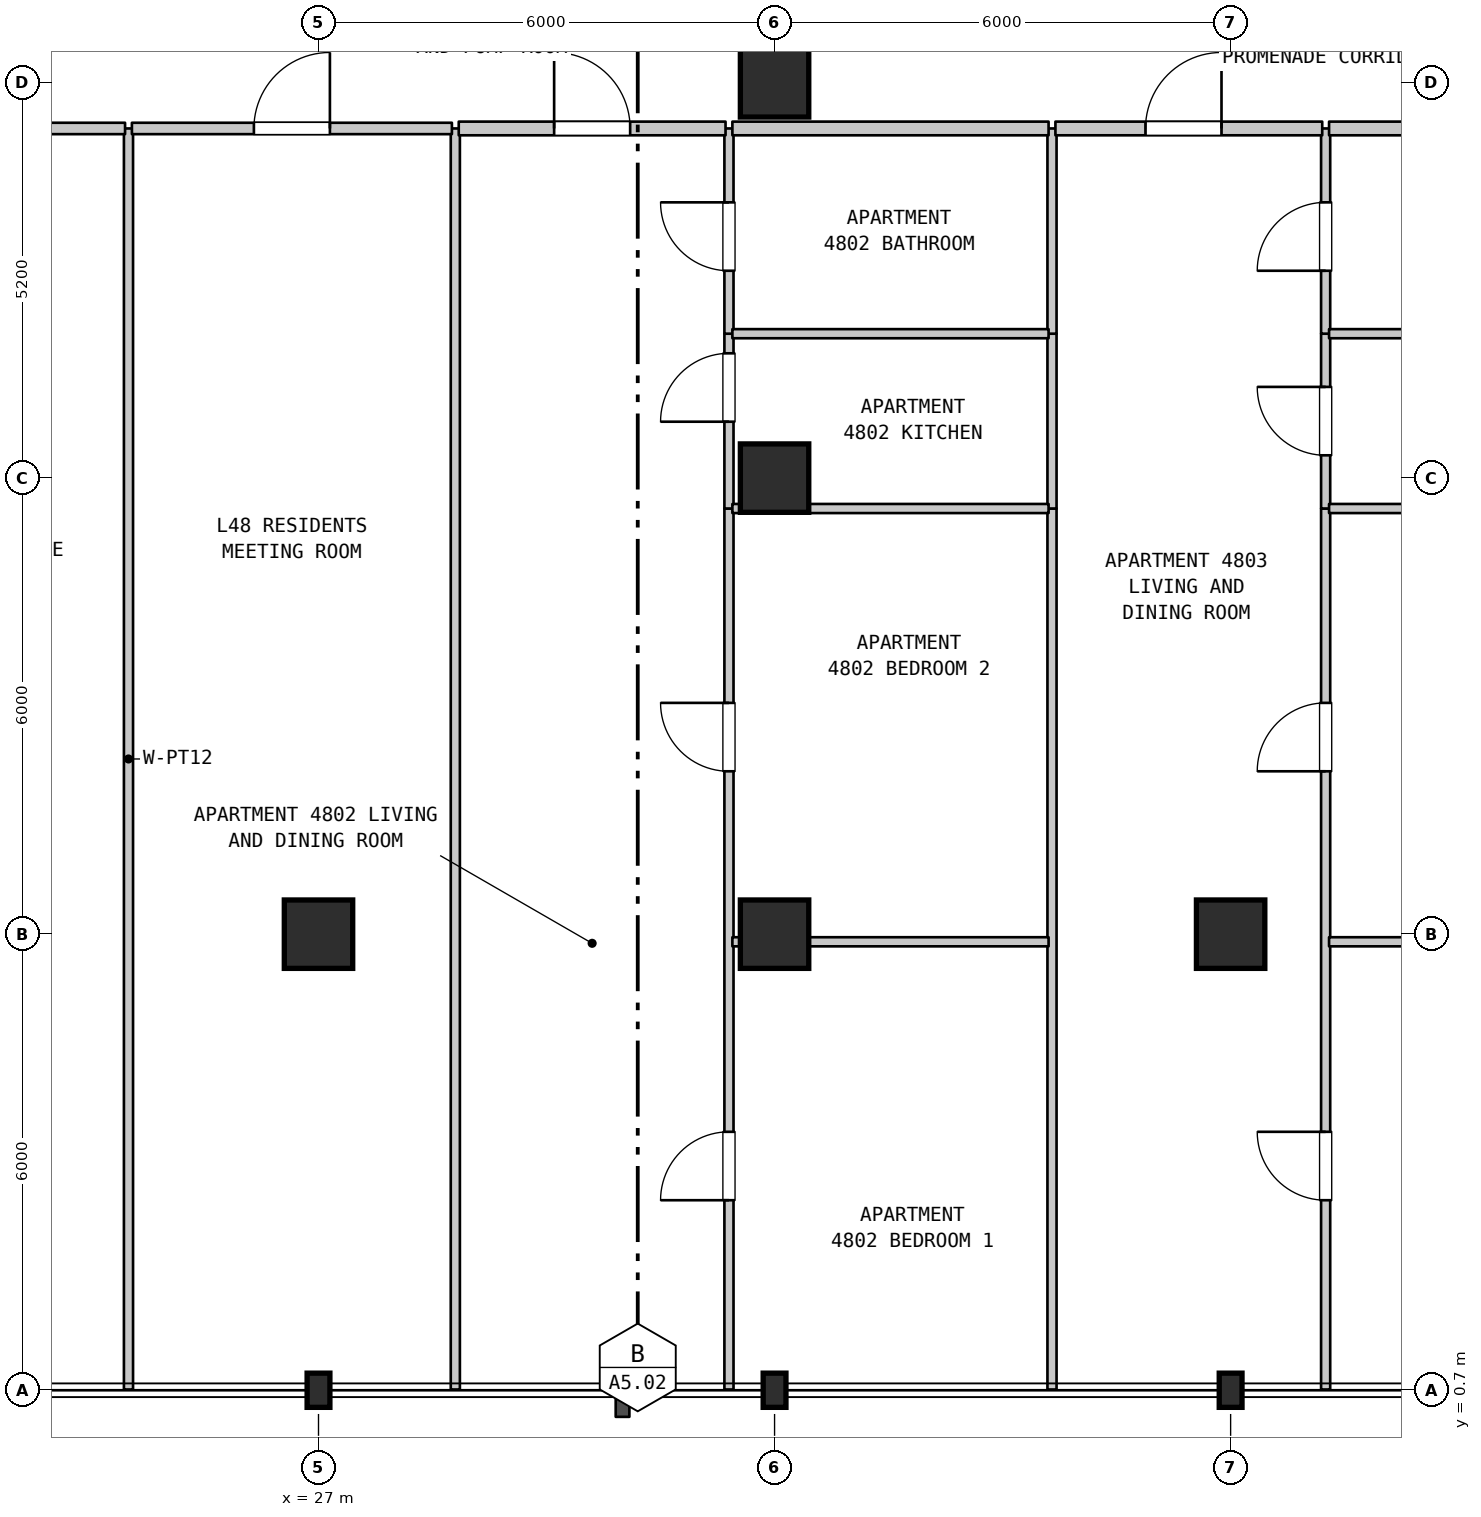
"""IFC4 building model, lengths in metres.
Left out: names, types, materials, properties, quantities, classifications, styles, units other than length and angle.
Written with IfcOpenShell. Run it as: python <this file> out.ifc"""

import sys

from ifc_helpers import new_model, si_unit, direction, frame, frame_2d, origin, origin_2d, place, context, subcontext, project, spatial, rectangle, i_section, extrude, element, fill, save


model = new_model("IFC4")
c1 = context("Model", 3, precision=1e-05, world=origin(), true_north=direction((0.0, 1.0)))
c2 = subcontext(c1, "Body", "Model", "MODEL_VIEW")
j1 = project(units=[si_unit("LENGTHUNIT", "METRE"), si_unit("PLANEANGLEUNIT", "RADIAN")], contexts=[c1])
p1 = place(None, origin())
s1 = spatial("IfcSite", under=j1, at=p1, CompositionType="ELEMENT")
p2 = place(p1, origin())
s2 = spatial("IfcBuilding", under=s1, at=p2, CompositionType="ELEMENT")
p3 = place(p2, frame((0.0, 0.0, 195.8)))
s3 = spatial("IfcBuildingStorey", under=s2, at=p3, CompositionType="ELEMENT", Elevation=195.8)
p4 = place(p3, frame((27.0, 0.7, 0.0), z_axis=(0.0, 0.0, 1.0), x_axis=(1.0, 0.0, 0.0)))
e1 = element("IfcColumn", 1, at=p4, inside=s3, PredefinedType="COLUMN", context=c2, shape_type="SweptSolid", body=[
    extrude(i_section(OverallWidth=0.3, OverallDepth=0.45, WebThickness=0.014, FlangeThickness=0.026, FilletRadius=0.027, at=origin_2d()), origin(), (0.0, 0.0, 1.0), 3.7),
])
p5 = place(p3, frame((27.0, 6.7, 0.0), z_axis=(0.0, 0.0, 1.0), x_axis=(1.0, 0.0, 0.0)))
e2 = element("IfcColumn", 2, at=p5, inside=s3, PredefinedType="COLUMN", context=c2, shape_type="SweptSolid", body=[
    extrude(rectangle(XDim=0.9, YDim=0.9, at=origin_2d()), origin(), (0.0, 0.0, 1.0), 3.7),
])
p6 = place(p3, frame((33.0, 0.7, 0.0), z_axis=(0.0, 0.0, 1.0), x_axis=(1.0, 0.0, 0.0)))
e3 = element("IfcColumn", 3, at=p6, inside=s3, PredefinedType="COLUMN", context=c2, shape_type="SweptSolid", body=[
    extrude(i_section(OverallWidth=0.3, OverallDepth=0.45, WebThickness=0.014, FlangeThickness=0.026, FilletRadius=0.027, at=origin_2d()), origin(), (0.0, 0.0, 1.0), 3.7),
])
for number, where, z_axis, x_axis in (
    (4, (33.0, 6.7, 0.0), (0.0, 0.0, 1.0), (1.0, 0.0, 0.0)),
    (5, (33.0, 12.7, 0.0), (0.0, 0.0, 1.0), (1.0, 0.0, 0.0)),
    (6, (33.0, 17.9, 0.0), (0.0, 0.0, 1.0), (1.0, 0.0, 0.0)),
):
    element("IfcColumn", number, at=place(p3, frame(where, z_axis=z_axis, x_axis=x_axis)), inside=s3, PredefinedType="COLUMN", context=c2, shape_type="SweptSolid", body=[
        extrude(rectangle(XDim=0.9, YDim=0.9, at=origin_2d()), origin(), (0.0, 0.0, 1.0), 3.7),
    ])
p7 = place(p3, frame((39.0, 0.7, 0.0), z_axis=(0.0, 0.0, 1.0), x_axis=(1.0, 0.0, 0.0)))
e7 = element("IfcColumn", 7, at=p7, inside=s3, PredefinedType="COLUMN", context=c2, shape_type="SweptSolid", body=[
    extrude(i_section(OverallWidth=0.3, OverallDepth=0.45, WebThickness=0.014, FlangeThickness=0.026, FilletRadius=0.027, at=origin_2d()), origin(), (0.0, 0.0, 1.0), 3.7),
])
p8 = place(p3, frame((39.0, 6.7, 0.0), z_axis=(0.0, 0.0, 1.0), x_axis=(1.0, 0.0, 0.0)))
e8 = element("IfcColumn", 8, at=p8, inside=s3, PredefinedType="COLUMN", context=c2, shape_type="SweptSolid", body=[
    extrude(rectangle(XDim=0.9, YDim=0.9, at=origin_2d()), origin(), (0.0, 0.0, 1.0), 3.7),
])
for number, where, z_axis, x_axis in (
    (9, (24.5, 0.71, 0.0), (0.0, 0.0, 1.0), (0.0, 1.0, 0.0)),
    (10, (28.8, 0.71, 0.0), (0.0, 0.0, 1.0), (0.0, 1.0, 0.0)),
):
    element("IfcWall", number, at=place(p3, frame(where, z_axis=z_axis, x_axis=x_axis)), inside=s3, PredefinedType="PARTITIONING", context=c2, shape_type="SweptSolid", body=[
        extrude(rectangle(XDim=16.59, YDim=0.12, at=frame_2d((8.295, 0.0))), origin(), (0.0, 0.0, 1.0), 3.39),
    ])
p9 = place(p3, frame((32.4, 0.71, 0.0), z_axis=(0.0, 0.0, 1.0), x_axis=(0.0, 1.0, 0.0)))
e11 = element("IfcWall", 11, at=p9, inside=s3, PredefinedType="PARTITIONING", context=c2, shape_type="SweptSolid", body=[
    extrude(rectangle(XDim=11.59, YDim=0.12, at=frame_2d((5.795, 0.0))), origin(), (0.0, 0.0, 1.0), 3.39),
])
p10 = place(p9, frame((2.49, 0.0, 0.0)))
e12 = element("IfcOpeningElement", 12, at=p10, cuts=e11, PredefinedType="OPENING", context=c2, shape_type="SweptSolid", body=[
    extrude(rectangle(XDim=0.9, YDim=2.15, at=frame_2d((0.45, 1.075))), frame((0.0, 0.07, 0.0), z_axis=(0.0, -1.0, 0.0), x_axis=(1.0, 0.0, 0.0)), (0.0, 0.0, 1.0), 0.14),
])
p11 = place(p9, frame((8.133, 0.0, 0.0)))
e13 = element("IfcOpeningElement", 13, at=p11, cuts=e11, PredefinedType="OPENING", context=c2, shape_type="SweptSolid", body=[
    extrude(rectangle(XDim=0.9, YDim=2.15, at=frame_2d((0.45, 1.075))), frame((0.0, 0.07, 0.0), z_axis=(0.0, -1.0, 0.0), x_axis=(1.0, 0.0, 0.0)), (0.0, 0.0, 1.0), 0.14),
])
p12 = place(p3, frame((32.4, 12.3, 0.0), z_axis=(0.0, 0.0, 1.0), x_axis=(0.0, 1.0, 0.0)))
e14 = element("IfcWall", 14, at=p12, inside=s3, PredefinedType="PARTITIONING", context=c2, shape_type="SweptSolid", body=[
    extrude(rectangle(XDim=2.3, YDim=0.12, at=frame_2d((1.15, 0.0))), origin(), (0.0, 0.0, 1.0), 3.39),
])
p13 = place(p12, frame((1.142, 0.0, 0.0)))
e15 = element("IfcOpeningElement", 15, at=p13, cuts=e14, PredefinedType="OPENING", context=c2, shape_type="SweptSolid", body=[
    extrude(rectangle(XDim=0.9, YDim=2.15, at=frame_2d((0.45, 1.075))), frame((0.0, 0.07, 0.0), z_axis=(0.0, -1.0, 0.0), x_axis=(1.0, 0.0, 0.0)), (0.0, 0.0, 1.0), 0.14),
])
p14 = place(p3, frame((32.4, 14.6, 0.0), z_axis=(0.0, 0.0, 1.0), x_axis=(0.0, 1.0, 0.0)))
e16 = element("IfcWall", 16, at=p14, inside=s3, PredefinedType="PARTITIONING", context=c2, shape_type="SweptSolid", body=[
    extrude(rectangle(XDim=2.7, YDim=0.12, at=frame_2d((1.35, 0.0))), origin(), (0.0, 0.0, 1.0), 3.39),
])
p15 = place(p14, frame((0.828, 0.0, 0.0)))
e17 = element("IfcOpeningElement", 17, at=p15, cuts=e16, PredefinedType="OPENING", context=c2, shape_type="SweptSolid", body=[
    extrude(rectangle(XDim=0.9, YDim=2.1, at=frame_2d((0.45, 1.05))), frame((0.0, 0.07, 0.0), z_axis=(0.0, -1.0, 0.0), x_axis=(1.0, 0.0, 0.0)), (0.0, 0.0, 1.0), 0.14),
])
p16 = place(p3, frame((36.65, 0.71, 0.0), z_axis=(0.0, 0.0, 1.0), x_axis=(0.0, 1.0, 0.0)))
e18 = element("IfcWall", 18, at=p16, inside=s3, PredefinedType="PARTITIONING", context=c2, shape_type="SweptSolid", body=[
    extrude(rectangle(XDim=11.59, YDim=0.12, at=frame_2d((5.795, 0.0))), origin(), (0.0, 0.0, 1.0), 3.39),
])
p17 = place(p3, frame((36.65, 12.3, 0.0), z_axis=(0.0, 0.0, 1.0), x_axis=(0.0, 1.0, 0.0)))
e19 = element("IfcWall", 19, at=p17, inside=s3, PredefinedType="PARTITIONING", context=c2, shape_type="SweptSolid", body=[
    extrude(rectangle(XDim=2.3, YDim=0.12, at=frame_2d((1.15, 0.0))), origin(), (0.0, 0.0, 1.0), 3.39),
])
p18 = place(p3, frame((36.65, 14.6, 0.0), z_axis=(0.0, 0.0, 1.0), x_axis=(0.0, 1.0, 0.0)))
e20 = element("IfcWall", 20, at=p18, inside=s3, PredefinedType="PARTITIONING", context=c2, shape_type="SweptSolid", body=[
    extrude(rectangle(XDim=2.7, YDim=0.12, at=frame_2d((1.35, 0.0))), origin(), (0.0, 0.0, 1.0), 3.39),
])
p19 = place(p3, frame((40.25, 0.71, 0.0), z_axis=(0.0, 0.0, 1.0), x_axis=(0.0, 1.0, 0.0)))
e21 = element("IfcWall", 21, at=p19, inside=s3, PredefinedType="PARTITIONING", context=c2, shape_type="SweptSolid", body=[
    extrude(rectangle(XDim=11.59, YDim=0.12, at=frame_2d((5.795, 0.0))), origin(), (0.0, 0.0, 1.0), 3.39),
])
p20 = place(p19, frame((2.49, 0.0, 0.0)))
e22 = element("IfcOpeningElement", 22, at=p20, cuts=e21, PredefinedType="OPENING", context=c2, shape_type="SweptSolid", body=[
    extrude(rectangle(XDim=0.9, YDim=2.15, at=frame_2d((0.45, 1.075))), frame((0.0, 0.07, 0.0), z_axis=(0.0, -1.0, 0.0), x_axis=(1.0, 0.0, 0.0)), (0.0, 0.0, 1.0), 0.14),
])
p21 = place(p19, frame((8.133, 0.0, 0.0)))
e23 = element("IfcOpeningElement", 23, at=p21, cuts=e21, PredefinedType="OPENING", context=c2, shape_type="SweptSolid", body=[
    extrude(rectangle(XDim=0.9, YDim=2.15, at=frame_2d((0.45, 1.075))), frame((0.0, 0.07, 0.0), z_axis=(0.0, -1.0, 0.0), x_axis=(1.0, 0.0, 0.0)), (0.0, 0.0, 1.0), 0.14),
])
p22 = place(p3, frame((40.25, 12.3, 0.0), z_axis=(0.0, 0.0, 1.0), x_axis=(0.0, 1.0, 0.0)))
e24 = element("IfcWall", 24, at=p22, inside=s3, PredefinedType="PARTITIONING", context=c2, shape_type="SweptSolid", body=[
    extrude(rectangle(XDim=2.3, YDim=0.12, at=frame_2d((1.15, 0.0))), origin(), (0.0, 0.0, 1.0), 3.39),
])
p23 = place(p22, frame((0.7, 0.0, 0.0)))
e25 = element("IfcOpeningElement", 25, at=p23, cuts=e24, PredefinedType="OPENING", context=c2, shape_type="SweptSolid", body=[
    extrude(rectangle(XDim=0.9, YDim=2.15, at=frame_2d((0.45, 1.075))), frame((0.0, 0.07, 0.0), z_axis=(0.0, -1.0, 0.0), x_axis=(1.0, 0.0, 0.0)), (0.0, 0.0, 1.0), 0.14),
])
p24 = place(p3, frame((40.25, 14.6, 0.0), z_axis=(0.0, 0.0, 1.0), x_axis=(0.0, 1.0, 0.0)))
e26 = element("IfcWall", 26, at=p24, inside=s3, PredefinedType="PARTITIONING", context=c2, shape_type="SweptSolid", body=[
    extrude(rectangle(XDim=2.7, YDim=0.12, at=frame_2d((1.35, 0.0))), origin(), (0.0, 0.0, 1.0), 3.39),
])
p25 = place(p24, frame((0.828, 0.0, 0.0)))
e27 = element("IfcOpeningElement", 27, at=p25, cuts=e26, PredefinedType="OPENING", context=c2, shape_type="SweptSolid", body=[
    extrude(rectangle(XDim=0.9, YDim=2.1, at=frame_2d((0.45, 1.05))), frame((0.0, 0.07, 0.0), z_axis=(0.0, -1.0, 0.0), x_axis=(1.0, 0.0, 0.0)), (0.0, 0.0, 1.0), 0.14),
])
p26 = place(p3, frame((32.445, 6.6, 0.0), z_axis=(0.0, 0.0, 1.0), x_axis=(1.0, 0.0, 0.0)))
e28 = element("IfcWall", 28, at=p26, inside=s3, PredefinedType="PARTITIONING", context=c2, shape_type="SweptSolid", body=[
    extrude(rectangle(XDim=4.16, YDim=0.12, at=frame_2d((2.08, 0.0))), origin(), (0.0, 0.0, 1.0), 3.09),
])
p27 = place(p3, frame((40.295, 6.6, 0.0), z_axis=(0.0, 0.0, 1.0), x_axis=(1.0, 0.0, 0.0)))
e29 = element("IfcWall", 29, at=p27, inside=s3, PredefinedType="PARTITIONING", context=c2, shape_type="SweptSolid", body=[
    extrude(rectangle(XDim=4.16, YDim=0.12, at=frame_2d((2.08, 0.0))), origin(), (0.0, 0.0, 1.0), 2.79),
])
p28 = place(p3, frame((32.445, 12.3, 0.0), z_axis=(0.0, 0.0, 1.0), x_axis=(1.0, 0.0, 0.0)))
e30 = element("IfcWall", 30, at=p28, inside=s3, PredefinedType="PARTITIONING", context=c2, shape_type="SweptSolid", body=[
    extrude(rectangle(XDim=4.16, YDim=0.12, at=frame_2d((2.08, 0.0))), origin(), (0.0, 0.0, 1.0), 3.39),
])
p29 = place(p3, frame((40.295, 12.3, 0.0), z_axis=(0.0, 0.0, 1.0), x_axis=(1.0, 0.0, 0.0)))
e31 = element("IfcWall", 31, at=p29, inside=s3, PredefinedType="PARTITIONING", context=c2, shape_type="SweptSolid", body=[
    extrude(rectangle(XDim=4.16, YDim=0.12, at=frame_2d((2.08, 0.0))), origin(), (0.0, 0.0, 1.0), 3.39),
])
p30 = place(p3, frame((32.445, 14.6, 0.0), z_axis=(0.0, 0.0, 1.0), x_axis=(1.0, 0.0, 0.0)))
e32 = element("IfcWall", 32, at=p30, inside=s3, PredefinedType="PARTITIONING", context=c2, shape_type="SweptSolid", body=[
    extrude(rectangle(XDim=4.16, YDim=0.12, at=frame_2d((2.08, 0.0))), origin(), (0.0, 0.0, 1.0), 3.39),
])
p31 = place(p3, frame((40.295, 14.6, 0.0), z_axis=(0.0, 0.0, 1.0), x_axis=(1.0, 0.0, 0.0)))
e33 = element("IfcWall", 33, at=p31, inside=s3, PredefinedType="PARTITIONING", context=c2, shape_type="SweptSolid", body=[
    extrude(rectangle(XDim=4.16, YDim=0.12, at=frame_2d((2.08, 0.0))), origin(), (0.0, 0.0, 1.0), 3.39),
])
p32 = place(p3, frame((20.545, 17.3, 0.0), z_axis=(0.0, 0.0, 1.0), x_axis=(1.0, 0.0, 0.0)))
e34 = element("IfcWall", 34, at=p32, inside=s3, PredefinedType="STANDARD", context=c2, shape_type="SweptSolid", body=[
    extrude(rectangle(XDim=3.91, YDim=0.15, at=frame_2d((1.955, 0.0))), origin(), (0.0, 0.0, 1.0), 3.39),
])
p33 = place(p32, frame((1.455, 0.0, 0.0)))
e35 = element("IfcOpeningElement", 35, at=p33, cuts=e34, PredefinedType="OPENING", context=c2, shape_type="SweptSolid", body=[
    extrude(rectangle(XDim=1.0, YDim=2.15, at=frame_2d((0.5, 1.075))), frame((0.0, 0.085, 0.0), z_axis=(0.0, -1.0, 0.0), x_axis=(1.0, 0.0, 0.0)), (0.0, 0.0, 1.0), 0.17),
])
p34 = place(p3, frame((24.545, 17.3, 0.0), z_axis=(0.0, 0.0, 1.0), x_axis=(1.0, 0.0, 0.0)))
e36 = element("IfcWall", 36, at=p34, inside=s3, PredefinedType="STANDARD", context=c2, shape_type="SweptSolid", body=[
    extrude(rectangle(XDim=4.21, YDim=0.15, at=frame_2d((2.105, 0.0))), origin(), (0.0, 0.0, 1.0), 3.39),
])
p35 = place(p34, frame((1.605, 0.0, 0.0)))
e37 = element("IfcOpeningElement", 37, at=p35, cuts=e36, PredefinedType="OPENING", context=c2, shape_type="SweptSolid", body=[
    extrude(rectangle(XDim=1.0, YDim=2.15, at=frame_2d((0.5, 1.075))), frame((0.0, 0.085, 0.0), z_axis=(0.0, -1.0, 0.0), x_axis=(1.0, 0.0, 0.0)), (0.0, 0.0, 1.0), 0.17),
])
p36 = place(p3, frame((28.845, 17.3, 0.0), z_axis=(0.0, 0.0, 1.0), x_axis=(1.0, 0.0, 0.0)))
e38 = element("IfcWall", 38, at=p36, inside=s3, PredefinedType="STANDARD", context=c2, shape_type="SweptSolid", body=[
    extrude(rectangle(XDim=3.51, YDim=0.18, at=frame_2d((1.755, 0.0))), origin(), (0.0, 0.0, 1.0), 3.39),
])
p37 = place(p36, frame((1.255, 0.0, 0.0)))
e39 = element("IfcOpeningElement", 39, at=p37, cuts=e38, PredefinedType="OPENING", context=c2, shape_type="SweptSolid", body=[
    extrude(rectangle(XDim=1.0, YDim=2.15, at=frame_2d((0.5, 1.075))), frame((0.0, 0.1, 0.0), z_axis=(0.0, -1.0, 0.0), x_axis=(1.0, 0.0, 0.0)), (0.0, 0.0, 1.0), 0.2),
])
p38 = place(p3, frame((32.445, 17.3, 0.0), z_axis=(0.0, 0.0, 1.0), x_axis=(1.0, 0.0, 0.0)))
e40 = element("IfcWall", 40, at=p38, inside=s3, PredefinedType="STANDARD", context=c2, shape_type="SweptSolid", body=[
    extrude(rectangle(XDim=4.16, YDim=0.18, at=frame_2d((2.08, 0.0))), origin(), (0.0, 0.0, 1.0), 3.39),
])
p39 = place(p3, frame((36.695, 17.3, 0.0), z_axis=(0.0, 0.0, 1.0), x_axis=(1.0, 0.0, 0.0)))
e41 = element("IfcWall", 41, at=p39, inside=s3, PredefinedType="STANDARD", context=c2, shape_type="SweptSolid", body=[
    extrude(rectangle(XDim=3.51, YDim=0.18, at=frame_2d((1.755, 0.0))), origin(), (0.0, 0.0, 1.0), 3.39),
])
p40 = place(p39, frame((1.185, 0.0, 0.0)))
e42 = element("IfcOpeningElement", 42, at=p40, cuts=e41, PredefinedType="OPENING", context=c2, shape_type="SweptSolid", body=[
    extrude(rectangle(XDim=1.0, YDim=2.15, at=frame_2d((0.5, 1.075))), frame((0.0, 0.1, 0.0), z_axis=(0.0, -1.0, 0.0), x_axis=(1.0, 0.0, 0.0)), (0.0, 0.0, 1.0), 0.2),
])
p41 = place(p3, frame((40.295, 17.3, 0.0), z_axis=(0.0, 0.0, 1.0), x_axis=(1.0, 0.0, 0.0)))
e43 = element("IfcWall", 43, at=p41, inside=s3, PredefinedType="STANDARD", context=c2, shape_type="SweptSolid", body=[
    extrude(rectangle(XDim=4.16, YDim=0.18, at=frame_2d((2.08, 0.0))), origin(), (0.0, 0.0, 1.0), 3.39),
])
p42 = place(p10, origin())
e44 = element("IfcDoor", 44, at=p42, inside=s3, OperationType="SINGLE_SWING_LEFT", PredefinedType="DOOR", context=c2, shape_type="SweptSolid", body=[
    extrude(rectangle(XDim=0.9, YDim=2.15, at=frame_2d((0.45, 1.075))), frame((0.0, 0.025, 0.0), z_axis=(0.0, -1.0, 0.0), x_axis=(1.0, 0.0, 0.0)), (0.0, 0.0, 1.0), 0.05),
])
fill(e12, e44)
p43 = place(p11, origin())
e45 = element("IfcDoor", 45, at=p43, inside=s3, OperationType="SINGLE_SWING_RIGHT", PredefinedType="DOOR", context=c2, shape_type="SweptSolid", body=[
    extrude(rectangle(XDim=0.9, YDim=2.15, at=frame_2d((0.45, 1.075))), frame((0.0, 0.025, 0.0), z_axis=(0.0, -1.0, 0.0), x_axis=(1.0, 0.0, 0.0)), (0.0, 0.0, 1.0), 0.05),
])
fill(e13, e45)
p44 = place(p13, origin())
e46 = element("IfcDoor", 46, at=p44, inside=s3, OperationType="SINGLE_SWING_LEFT", PredefinedType="DOOR", context=c2, shape_type="SweptSolid", body=[
    extrude(rectangle(XDim=0.9, YDim=2.15, at=frame_2d((0.45, 1.075))), frame((0.0, 0.025, 0.0), z_axis=(0.0, -1.0, 0.0), x_axis=(1.0, 0.0, 0.0)), (0.0, 0.0, 1.0), 0.05),
])
fill(e15, e46)
p45 = place(p15, origin())
e47 = element("IfcDoor", 47, at=p45, inside=s3, OperationType="SINGLE_SWING_RIGHT", PredefinedType="DOOR", context=c2, shape_type="SweptSolid", body=[
    extrude(rectangle(XDim=0.9, YDim=2.1, at=frame_2d((0.45, 1.05))), frame((0.0, 0.025, 0.0), z_axis=(0.0, -1.0, 0.0), x_axis=(1.0, 0.0, 0.0)), (0.0, 0.0, 1.0), 0.05),
])
fill(e17, e47)
p46 = place(p20, origin())
e48 = element("IfcDoor", 48, at=p46, inside=s3, OperationType="SINGLE_SWING_RIGHT", PredefinedType="DOOR", context=c2, shape_type="SweptSolid", body=[
    extrude(rectangle(XDim=0.9, YDim=2.15, at=frame_2d((0.45, 1.075))), frame((0.0, 0.025, 0.0), z_axis=(0.0, -1.0, 0.0), x_axis=(1.0, 0.0, 0.0)), (0.0, 0.0, 1.0), 0.05),
])
fill(e22, e48)
p47 = place(p21, origin())
e49 = element("IfcDoor", 49, at=p47, inside=s3, OperationType="SINGLE_SWING_LEFT", PredefinedType="DOOR", context=c2, shape_type="SweptSolid", body=[
    extrude(rectangle(XDim=0.9, YDim=2.15, at=frame_2d((0.45, 1.075))), frame((0.0, 0.025, 0.0), z_axis=(0.0, -1.0, 0.0), x_axis=(1.0, 0.0, 0.0)), (0.0, 0.0, 1.0), 0.05),
])
fill(e23, e49)
p48 = place(p23, origin())
e50 = element("IfcDoor", 50, at=p48, inside=s3, OperationType="SINGLE_SWING_RIGHT", PredefinedType="DOOR", context=c2, shape_type="SweptSolid", body=[
    extrude(rectangle(XDim=0.9, YDim=2.15, at=frame_2d((0.45, 1.075))), frame((0.0, 0.025, 0.0), z_axis=(0.0, -1.0, 0.0), x_axis=(1.0, 0.0, 0.0)), (0.0, 0.0, 1.0), 0.05),
])
fill(e25, e50)
p49 = place(p25, origin())
e51 = element("IfcDoor", 51, at=p49, inside=s3, OperationType="SINGLE_SWING_LEFT", PredefinedType="DOOR", context=c2, shape_type="SweptSolid", body=[
    extrude(rectangle(XDim=0.9, YDim=2.1, at=frame_2d((0.45, 1.05))), frame((0.0, 0.025, 0.0), z_axis=(0.0, -1.0, 0.0), x_axis=(1.0, 0.0, 0.0)), (0.0, 0.0, 1.0), 0.05),
])
fill(e27, e51)
p50 = place(p35, origin())
e52 = element("IfcDoor", 52, at=p50, inside=s3, OperationType="SINGLE_SWING_RIGHT", PredefinedType="DOOR", context=c2, shape_type="SweptSolid", body=[
    extrude(rectangle(XDim=1.0, YDim=2.15, at=frame_2d((0.5, 1.075))), frame((0.0, 0.025, 0.0), z_axis=(0.0, -1.0, 0.0), x_axis=(1.0, 0.0, 0.0)), (0.0, 0.0, 1.0), 0.05),
])
fill(e37, e52)
p51 = place(p37, origin())
e53 = element("IfcDoor", 53, at=p51, inside=s3, OperationType="SINGLE_SWING_LEFT", PredefinedType="DOOR", context=c2, shape_type="SweptSolid", body=[
    extrude(rectangle(XDim=1.0, YDim=2.15, at=frame_2d((0.5, 1.075))), frame((0.0, 0.025, 0.0), z_axis=(0.0, -1.0, 0.0), x_axis=(1.0, 0.0, 0.0)), (0.0, 0.0, 1.0), 0.05),
])
fill(e39, e53)
p52 = place(p40, origin())
e54 = element("IfcDoor", 54, at=p52, inside=s3, OperationType="SINGLE_SWING_RIGHT", PredefinedType="DOOR", context=c2, shape_type="SweptSolid", body=[
    extrude(rectangle(XDim=1.0, YDim=2.15, at=frame_2d((0.5, 1.075))), frame((0.0, 0.025, 0.0), z_axis=(0.0, -1.0, 0.0), x_axis=(1.0, 0.0, 0.0)), (0.0, 0.0, 1.0), 0.05),
])
fill(e42, e54)
save(model, sys.argv[1])
